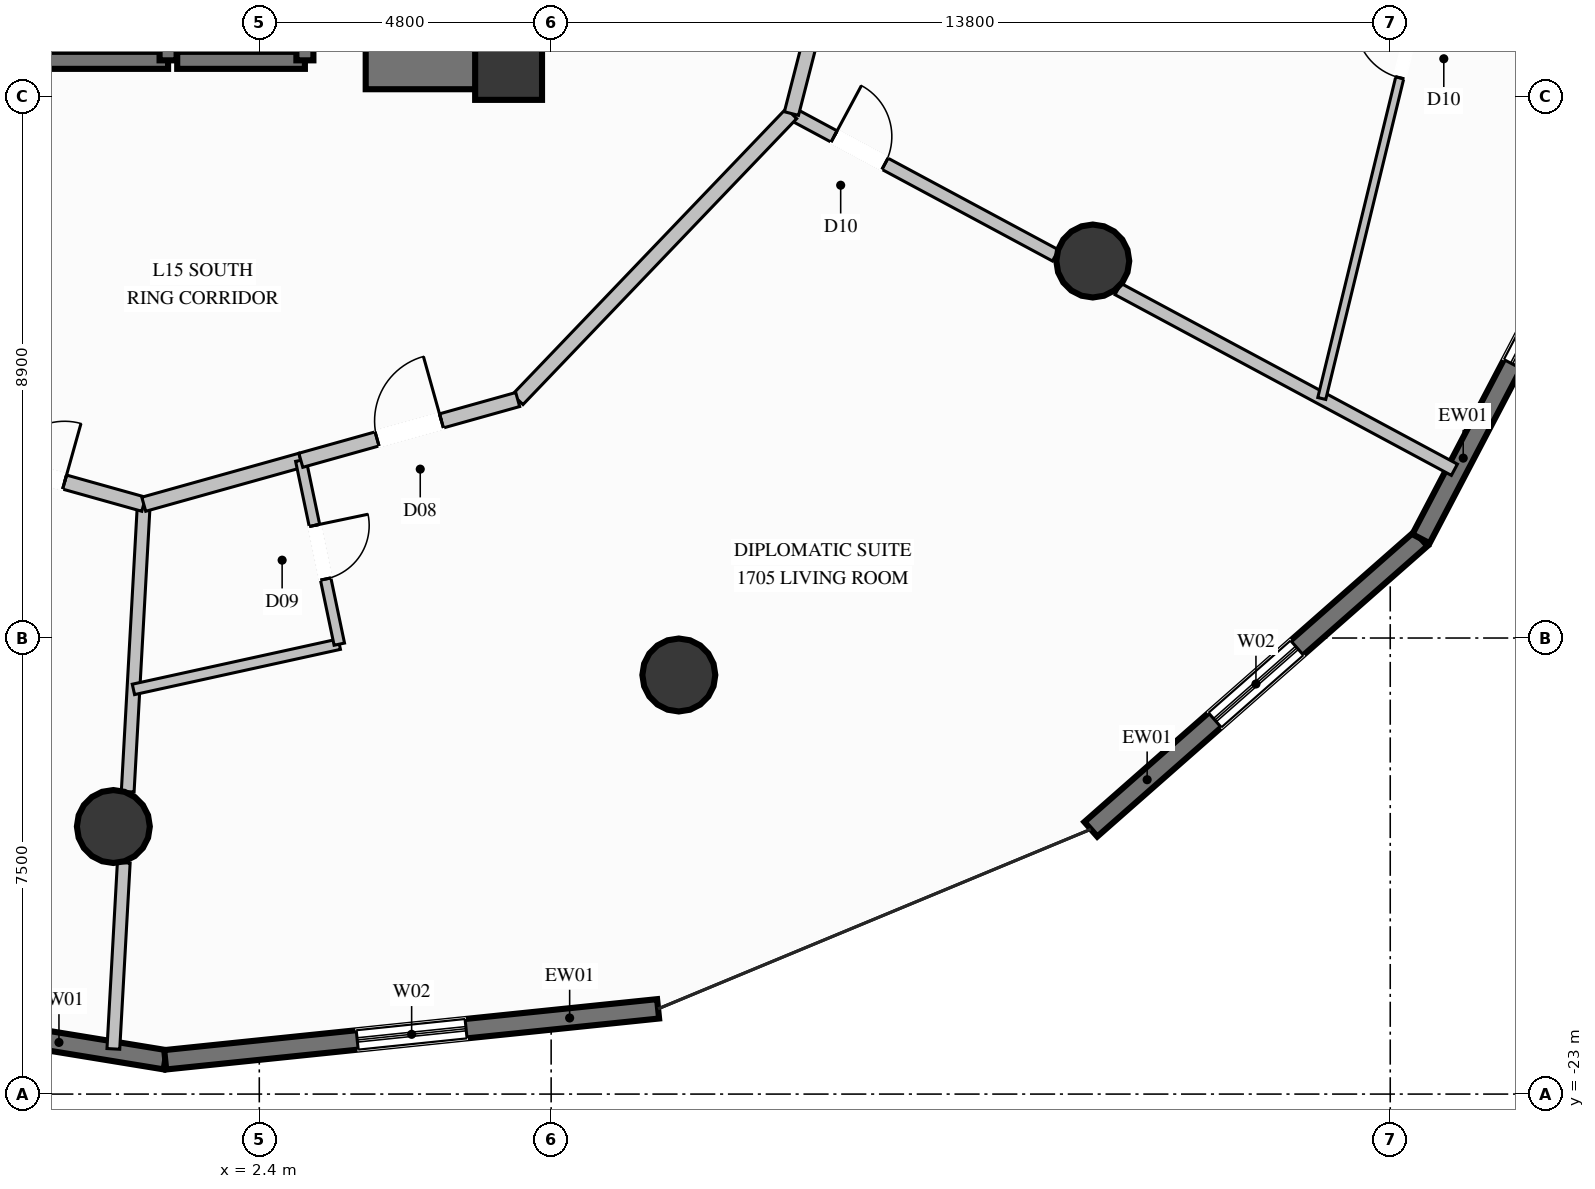
"""IFC4 building model, lengths in metres.
Left out: names, types, materials, properties, quantities, classifications, styles, units other than length and angle.
Written with IfcOpenShell. Run it as: python <this file> out.ifc"""

import sys

from ifc_helpers import new_model, si_unit, direction, frame, frame_2d, origin, origin_2d, place, context, subcontext, project, spatial, rectangle, circle, extrude, element, fill, save


model = new_model("IFC4")
c1 = context("Model", 3, precision=1e-05, world=origin(), true_north=direction((0.0, 1.0)))
c2 = subcontext(c1, "Body", "Model", "MODEL_VIEW")
j1 = project(units=[si_unit("LENGTHUNIT", "METRE"), si_unit("PLANEANGLEUNIT", "RADIAN")], contexts=[c1])
p1 = place(None, origin())
s1 = spatial("IfcSite", under=j1, at=p1, CompositionType="ELEMENT")
p2 = place(p1, origin())
s2 = spatial("IfcBuilding", under=s1, at=p2, CompositionType="ELEMENT")
p3 = place(p2, frame((0.0, 0.0, 64.4)))
s3 = spatial("IfcBuildingStorey", under=s2, at=p3, CompositionType="ELEMENT", Elevation=64.4)
p4 = place(p3, frame((6.5, -6.1, 0.0), z_axis=(0.0, 0.0, 1.0), x_axis=(1.0, 0.0, 0.0)))
e1 = element("IfcColumn", 1, at=p4, inside=s3, PredefinedType="COLUMN", context=c2, shape_type="SweptSolid", body=[
    extrude(rectangle(XDim=1.1, YDim=1.1, at=origin_2d()), origin(), (0.0, 0.0, 1.0), 3.6),
])
p5 = place(p3, frame((4.15, -6.1, 0.0), z_axis=(0.0, 0.0, 1.0), x_axis=(1.0, 0.0, 0.0)))
e2 = element("IfcWall", 2, at=p5, inside=s3, PredefinedType="SHEAR", context=c2, shape_type="SweptSolid", body=[
    extrude(rectangle(XDim=1.975, YDim=0.75, at=frame_2d((0.988, 0.0))), origin(), (0.0, 0.0, 1.0), 3.6),
])
p6 = place(p3, frame((6.5, -6.475, 0.0), z_axis=(0.0, 0.0, 1.0), x_axis=(0.0, 1.0, 0.0)))
e3 = element("IfcWall", 3, at=p6, inside=s3, PredefinedType="SHEAR", context=c2, shape_type="SweptSolid", body=[
    extrude(rectangle(XDim=4.125, YDim=0.75, at=frame_2d((2.062, 0.0))), origin(), (0.0, 0.0, 1.0), 3.6),
])
for number, where, z_axis, x_axis in (
    (4, (0.0, -18.6, 0.0), (0.0, 0.0, 1.0), (1.0, 0.0, 0.0)),
    (5, (9.3, -16.108, 0.0), (0.0, 0.0, 1.0), (1.0, 0.0, 0.0)),
    (6, (16.108, -9.3, 0.0), (0.0, 0.0, 1.0), (1.0, 0.0, 0.0)),
):
    element("IfcColumn", number, at=place(p3, frame(where, z_axis=z_axis, x_axis=x_axis)), inside=s3, PredefinedType="COLUMN", context=c2, shape_type="SweptSolid", body=[
        extrude(circle(Radius=0.6, at=origin_2d()), origin(), (0.0, 0.0, 1.0), 3.6),
    ])
p7 = place(p3, frame((0.853, -22.436, 0.0), z_axis=(0.0, 0.0, 1.0), x_axis=(-0.986907440065, 0.161287645973, 0.0)))
e7 = element("IfcWall", 7, at=p7, inside=s3, PredefinedType="SOLIDWALL", context=c2, shape_type="SweptSolid", body=[
    extrude(rectangle(XDim=8.413, YDim=0.32, at=frame_2d((4.207, 0.0))), origin(), (0.0, 0.0, 1.0), 3.34),
])
p8 = place(p7, frame((3.792, 0.0, 0.35)))
e8 = element("IfcOpeningElement", 8, at=p8, cuts=e7, PredefinedType="OPENING", context=c2, shape_type="SweptSolid", body=[
    extrude(rectangle(XDim=1.8, YDim=2.6, at=frame_2d((0.9, 1.3))), frame((0.0, 0.17, 0.0), z_axis=(0.0, -1.0, 0.0), x_axis=(1.0, 0.0, 0.0)), (0.0, 0.0, 1.0), 0.34),
])
p9 = place(p3, frame((8.959, -21.598, 0.0), z_axis=(0.0, 0.0, 1.0), x_axis=(-0.994696973701, -0.102849066644, 0.0)))
e9 = element("IfcWall", 9, at=p9, inside=s3, PredefinedType="SOLIDWALL", context=c2, shape_type="SweptSolid", body=[
    extrude(rectangle(XDim=8.149, YDim=0.32, at=frame_2d((4.075, 0.0))), origin(), (0.0, 0.0, 1.0), 3.34),
])
p10 = place(p9, frame((3.175, 0.0, 0.35)))
e10 = element("IfcOpeningElement", 10, at=p10, cuts=e9, PredefinedType="OPENING", context=c2, shape_type="SweptSolid", body=[
    extrude(rectangle(XDim=1.8, YDim=2.6, at=frame_2d((0.9, 1.3))), frame((0.0, 0.17, 0.0), z_axis=(0.0, -1.0, 0.0), x_axis=(1.0, 0.0, 0.0)), (0.0, 0.0, 1.0), 0.34),
])
p11 = place(p3, frame((21.506, -13.867, 0.0), z_axis=(0.0, 0.0, 1.0), x_axis=(-0.750746326024, -0.660590609955, 0.0)))
e11 = element("IfcWall", 11, at=p11, inside=s3, PredefinedType="SOLIDWALL", context=c2, shape_type="SweptSolid", body=[
    extrude(rectangle(XDim=7.233, YDim=0.32, at=frame_2d((3.617, 0.0))), origin(), (0.0, 0.0, 1.0), 3.34),
])
p12 = place(p11, frame((2.716, 0.0, 0.35)))
e12 = element("IfcOpeningElement", 12, at=p12, cuts=e11, PredefinedType="OPENING", context=c2, shape_type="SweptSolid", body=[
    extrude(rectangle(XDim=1.8, YDim=2.6, at=frame_2d((0.9, 1.3))), frame((0.0, 0.17, 0.0), z_axis=(0.0, -1.0, 0.0), x_axis=(1.0, 0.0, 0.0)), (0.0, 0.0, 1.0), 0.34),
])
p13 = place(p3, frame((24.719, -7.732, 0.0), z_axis=(0.0, 0.0, 1.0), x_axis=(-0.463929273227, -0.885872242168, 0.0)))
e13 = element("IfcWall", 13, at=p13, inside=s3, PredefinedType="SOLIDWALL", context=c2, shape_type="SweptSolid", body=[
    extrude(rectangle(XDim=6.925, YDim=0.32, at=frame_2d((3.463, 0.0))), origin(), (0.0, 0.0, 1.0), 3.34),
])
p14 = place(p13, frame((1.883, 0.0, 0.35)))
e14 = element("IfcOpeningElement", 14, at=p14, cuts=e13, PredefinedType="OPENING", context=c2, shape_type="SweptSolid", body=[
    extrude(rectangle(XDim=1.8, YDim=2.6, at=frame_2d((0.9, 1.3))), frame((0.0, 0.17, 0.0), z_axis=(0.0, -1.0, 0.0), x_axis=(1.0, 0.0, 0.0)), (0.0, 0.0, 1.0), 0.34),
])
p15 = place(p3, frame((-1.2, -6.0, 0.0), z_axis=(0.0, 0.0, 1.0), x_axis=(1.0, 0.0, 0.0)))
e15 = element("IfcWall", 15, at=p15, inside=s3, PredefinedType="SOLIDWALL", context=c2, shape_type="SweptSolid", body=[
    extrude(rectangle(XDim=2.1, YDim=0.28, at=frame_2d((1.05, 0.0))), origin(), (0.0, 0.0, 1.0), 3.34),
])
p16 = place(p3, frame((0.9, -6.0, 0.0), z_axis=(0.0, 0.0, 1.0), x_axis=(0.0, 1.0, 0.0)))
e16 = element("IfcWall", 16, at=p16, inside=s3, PredefinedType="SOLIDWALL", context=c2, shape_type="SweptSolid", body=[
    extrude(rectangle(XDim=2.5, YDim=0.28, at=frame_2d((1.25, 0.0))), origin(), (0.0, 0.0, 1.0), 3.34),
])
p17 = place(p3, frame((1.05, -6.0, 0.0), z_axis=(0.0, 0.0, 1.0), x_axis=(1.0, 0.0, 0.0)))
e17 = element("IfcWall", 17, at=p17, inside=s3, PredefinedType="SOLIDWALL", context=c2, shape_type="SweptSolid", body=[
    extrude(rectangle(XDim=2.1, YDim=0.28, at=frame_2d((1.05, 0.0))), origin(), (0.0, 0.0, 1.0), 3.34),
])
p18 = place(p3, frame((3.15, -6.0, 0.0), z_axis=(0.0, 0.0, 1.0), x_axis=(0.0, 1.0, 0.0)))
e18 = element("IfcWall", 18, at=p18, inside=s3, PredefinedType="SOLIDWALL", context=c2, shape_type="SweptSolid", body=[
    extrude(rectangle(XDim=2.5, YDim=0.28, at=frame_2d((1.25, 0.0))), origin(), (0.0, 0.0, 1.0), 3.34),
])
p19 = place(p3, frame((0.5, -13.3, 0.0), z_axis=(0.0, 0.0, 1.0), x_axis=(-0.05574419663, -0.998445083388, 0.0)))
e19 = element("IfcWall", 19, at=p19, inside=s3, PredefinedType="PARTITIONING", context=c2, shape_type="SweptSolid", body=[
    extrude(rectangle(XDim=4.734, YDim=0.21, at=frame_2d((2.367, 0.0))), origin(), (0.0, 0.0, 1.0), 3.34),
])
p20 = place(p3, frame((0.171, -19.196, 0.0), z_axis=(0.0, 0.0, 1.0), x_axis=(-0.055743466812, -0.998445124134, 0.0)))
e20 = element("IfcWall", 20, at=p20, inside=s3, PredefinedType="PARTITIONING", context=c2, shape_type="SweptSolid", body=[
    extrude(rectangle(XDim=3.066, YDim=0.21, at=frame_2d((1.533, 0.0))), origin(), (0.0, 0.0, 1.0), 3.34),
])
p21 = place(p3, frame((11.152, -6.875, 0.0), z_axis=(0.0, 0.0, 1.0), x_axis=(0.880939761167, -0.473228419682, 0.0)))
e21 = element("IfcWall", 21, at=p21, inside=s3, PredefinedType="PARTITIONING", context=c2, shape_type="SweptSolid", body=[
    extrude(rectangle(XDim=4.93, YDim=0.21, at=frame_2d((2.465, 0.0))), origin(), (0.0, 0.0, 1.0), 2.708),
])
p22 = place(p21, frame((0.796, 0.0, 0.0)))
e22 = element("IfcOpeningElement", 22, at=p22, cuts=e21, PredefinedType="OPENING", context=c2, shape_type="SweptSolid", body=[
    extrude(rectangle(XDim=0.95, YDim=2.1, at=frame_2d((0.475, 1.05))), frame((0.0, 0.115, 0.0), z_axis=(0.0, -1.0, 0.0), x_axis=(1.0, 0.0, 0.0)), (0.0, 0.0, 1.0), 0.23),
])
p23 = place(p3, frame((16.523, -9.761, 0.0), z_axis=(0.0, 0.0, 1.0), x_axis=(0.88092509849, -0.473255714017, 0.0)))
e23 = element("IfcWall", 23, at=p23, inside=s3, PredefinedType="PARTITIONING", context=c2, shape_type="SweptSolid", body=[
    extrude(rectangle(XDim=6.28, YDim=0.21, at=frame_2d((3.14, 0.0))), origin(), (0.0, 0.0, 1.0), 3.34),
])
p24 = place(p3, frame((-3.067, -12.301, 0.0), z_axis=(0.0, 0.0, 1.0), x_axis=(0.962943481199, -0.269703266603, 0.0)))
e24 = element("IfcWall", 24, at=p24, inside=s3, PredefinedType="PARTITIONING", context=c2, shape_type="SweptSolid", body=[
    extrude(rectangle(XDim=3.704, YDim=0.24, at=frame_2d((1.852, 0.0))), origin(), (0.0, 0.0, 1.0), 2.917),
])
p25 = place(p24, frame((1.352, 0.0, 0.0)))
e25 = element("IfcOpeningElement", 25, at=p25, cuts=e24, PredefinedType="OPENING", context=c2, shape_type="SweptSolid", body=[
    extrude(rectangle(XDim=1.0, YDim=2.2, at=frame_2d((0.5, 1.1))), frame((0.0, 0.13, 0.0), z_axis=(0.0, -1.0, 0.0), x_axis=(1.0, 0.0, 0.0)), (0.0, 0.0, 1.0), 0.26),
])
p26 = place(p3, frame((0.5, -13.3, 0.0), z_axis=(0.0, 0.0, 1.0), x_axis=(0.96297347206, 0.269596164862, 0.0)))
e26 = element("IfcWall", 26, at=p26, inside=s3, PredefinedType="PARTITIONING", context=c2, shape_type="SweptSolid", body=[
    extrude(rectangle(XDim=2.682, YDim=0.24, at=frame_2d((1.341, 0.0))), origin(), (0.0, 0.0, 1.0), 3.34),
])
p27 = place(p3, frame((0.33, -16.345, 0.0), z_axis=(0.0, 0.0, 1.0), x_axis=(0.976706198213, 0.21458099257, 0.0)))
e27 = element("IfcWall", 27, at=p27, inside=s3, PredefinedType="PLUMBINGWALL", context=c2, shape_type="SweptSolid", body=[
    extrude(rectangle(XDim=3.467, YDim=0.175, at=frame_2d((1.733, 0.0))), origin(), (0.0, 0.0, 1.0), 3.34),
])
p28 = place(p3, frame((3.083, -12.577, 0.0), z_axis=(0.0, 0.0, 1.0), x_axis=(0.204891321789, -0.978784729272, 0.0)))
e28 = element("IfcWall", 28, at=p28, inside=s3, PredefinedType="PLUMBINGWALL", context=c2, shape_type="SweptSolid", body=[
    extrude(rectangle(XDim=3.09, YDim=0.175, at=frame_2d((1.545, 0.0))), origin(), (0.0, 0.0, 1.0), 3.34),
])
p29 = place(p28, frame((1.095, 0.0, 0.0)))
e29 = element("IfcOpeningElement", 29, at=p29, cuts=e28, PredefinedType="OPENING", context=c2, shape_type="SweptSolid", body=[
    extrude(rectangle(XDim=0.9, YDim=2.1, at=frame_2d((0.45, 1.05))), frame((0.0, 0.098, 0.0), z_axis=(0.0, -1.0, 0.0), x_axis=(1.0, 0.0, 0.0)), (0.0, 0.0, 1.0), 0.195),
])
p30 = place(p3, frame((6.65, -11.578, 0.0), z_axis=(0.0, 0.0, 1.0), x_axis=(0.691526541012, 0.72235105252, 0.0)))
e30 = element("IfcWall", 30, at=p30, inside=s3, PredefinedType="PARTITIONING", context=c2, shape_type="SweptSolid", body=[
    extrude(rectangle(XDim=6.51, YDim=0.24, at=frame_2d((3.255, 0.0))), origin(), (0.0, 0.0, 1.0), 3.34),
])
p31 = place(p3, frame((3.083, -12.577, 0.0), z_axis=(0.0, 0.0, 1.0), x_axis=(0.962943481199, 0.269703266603, 0.0)))
e31 = element("IfcWall", 31, at=p31, inside=s3, PredefinedType="PARTITIONING", context=c2, shape_type="SweptSolid", body=[
    extrude(rectangle(XDim=3.704, YDim=0.24, at=frame_2d((1.852, 0.0))), origin(), (0.0, 0.0, 1.0), 2.917),
])
p32 = place(p31, frame((1.302, 0.0, 0.0)))
e32 = element("IfcOpeningElement", 32, at=p32, cuts=e31, PredefinedType="OPENING", context=c2, shape_type="SweptSolid", body=[
    extrude(rectangle(XDim=1.1, YDim=2.3, at=frame_2d((0.55, 1.15))), frame((0.0, 0.13, 0.0), z_axis=(0.0, -1.0, 0.0), x_axis=(1.0, 0.0, 0.0)), (0.0, 0.0, 1.0), 0.26),
])
p33 = place(p3, frame((11.152, -6.875, 0.0), z_axis=(0.0, 0.0, 1.0), x_axis=(0.248446193127, 0.968645698447, 0.0)))
e33 = element("IfcWall", 33, at=p33, inside=s3, PredefinedType="PARTITIONING", context=c2, shape_type="SweptSolid", body=[
    extrude(rectangle(XDim=6.633, YDim=0.24, at=frame_2d((3.316, 0.0))), origin(), (0.0, 0.0, 1.0), 2.917),
])
p34 = place(p3, frame((19.874, -11.561, 0.0), z_axis=(0.0, 0.0, 1.0), x_axis=(0.236258171871, 0.971690319096, 0.0)))
e34 = element("IfcWall", 34, at=p34, inside=s3, PredefinedType="PARTITIONING", context=c2, shape_type="SweptSolid", body=[
    extrude(rectangle(XDim=11.805, YDim=0.135, at=frame_2d((5.903, 0.0))), origin(), (0.0, 0.0, 1.0), 3.34),
])
p35 = place(p34, frame((5.428, 0.0, 0.0)))
e35 = element("IfcOpeningElement", 35, at=p35, cuts=e34, PredefinedType="OPENING", context=c2, shape_type="SweptSolid", body=[
    extrude(rectangle(XDim=0.95, YDim=2.1, at=frame_2d((0.475, 1.05))), frame((0.0, 0.078, 0.0), z_axis=(0.0, -1.0, 0.0), x_axis=(1.0, 0.0, 0.0)), (0.0, 0.0, 1.0), 0.155),
])
p36 = place(p10, origin())
e36 = element("IfcWindow", 36, at=p36, inside=s3, PartitioningType="SINGLE_PANEL", PredefinedType="WINDOW", context=c2, shape_type="SweptSolid", body=[
    extrude(rectangle(XDim=1.8, YDim=2.6, at=frame_2d((0.9, 1.3))), frame((0.0, 0.03, 0.0), z_axis=(0.0, -1.0, 0.0), x_axis=(1.0, 0.0, 0.0)), (0.0, 0.0, 1.0), 0.06),
])
fill(e10, e36)
p37 = place(p12, origin())
e37 = element("IfcWindow", 37, at=p37, inside=s3, PartitioningType="SINGLE_PANEL", PredefinedType="WINDOW", context=c2, shape_type="SweptSolid", body=[
    extrude(rectangle(XDim=1.8, YDim=2.6, at=frame_2d((0.9, 1.3))), frame((0.0, 0.03, 0.0), z_axis=(0.0, -1.0, 0.0), x_axis=(1.0, 0.0, 0.0)), (0.0, 0.0, 1.0), 0.06),
])
fill(e12, e37)
p38 = place(p14, origin())
e38 = element("IfcWindow", 38, at=p38, inside=s3, PartitioningType="SINGLE_PANEL", PredefinedType="WINDOW", context=c2, shape_type="SweptSolid", body=[
    extrude(rectangle(XDim=1.8, YDim=2.6, at=frame_2d((0.9, 1.3))), frame((0.0, 0.03, 0.0), z_axis=(0.0, -1.0, 0.0), x_axis=(1.0, 0.0, 0.0)), (0.0, 0.0, 1.0), 0.06),
])
fill(e14, e38)
p39 = place(p25, origin())
e39 = element("IfcDoor", 39, at=p39, inside=s3, OperationType="SINGLE_SWING_RIGHT", PredefinedType="DOOR", context=c2, shape_type="SweptSolid", body=[
    extrude(rectangle(XDim=1.0, YDim=2.2, at=frame_2d((0.5, 1.1))), frame((0.0, 0.025, 0.0), z_axis=(0.0, -1.0, 0.0), x_axis=(1.0, 0.0, 0.0)), (0.0, 0.0, 1.0), 0.05),
])
fill(e25, e39)
p40 = place(p29, origin())
e40 = element("IfcDoor", 40, at=p40, inside=s3, OperationType="SINGLE_SWING_LEFT", PredefinedType="DOOR", context=c2, shape_type="SweptSolid", body=[
    extrude(rectangle(XDim=0.9, YDim=2.1, at=frame_2d((0.45, 1.05))), frame((0.0, 0.025, 0.0), z_axis=(0.0, -1.0, 0.0), x_axis=(1.0, 0.0, 0.0)), (0.0, 0.0, 1.0), 0.05),
])
fill(e29, e40)
p41 = place(p32, origin())
e41 = element("IfcDoor", 41, at=p41, inside=s3, OperationType="SINGLE_SWING_RIGHT", PredefinedType="DOOR", context=c2, shape_type="SweptSolid", body=[
    extrude(rectangle(XDim=1.1, YDim=2.3, at=frame_2d((0.55, 1.15))), frame((0.0, 0.025, 0.0), z_axis=(0.0, -1.0, 0.0), x_axis=(1.0, 0.0, 0.0)), (0.0, 0.0, 1.0), 0.05),
])
fill(e32, e41)
p42 = place(p22, origin())
e42 = element("IfcDoor", 42, at=p42, inside=s3, OperationType="SINGLE_SWING_LEFT", PredefinedType="DOOR", context=c2, shape_type="SweptSolid", body=[
    extrude(rectangle(XDim=0.95, YDim=2.1, at=frame_2d((0.475, 1.05))), frame((0.0, 0.025, 0.0), z_axis=(0.0, -1.0, 0.0), x_axis=(1.0, 0.0, 0.0)), (0.0, 0.0, 1.0), 0.05),
])
fill(e22, e42)
p43 = place(p35, origin())
e43 = element("IfcDoor", 43, at=p43, inside=s3, OperationType="SINGLE_SWING_RIGHT", PredefinedType="DOOR", context=c2, shape_type="SweptSolid", body=[
    extrude(rectangle(XDim=0.95, YDim=2.1, at=frame_2d((0.475, 1.05))), frame((0.0, 0.025, 0.0), z_axis=(0.0, -1.0, 0.0), x_axis=(1.0, 0.0, 0.0)), (0.0, 0.0, 1.0), 0.05),
])
fill(e35, e43)
save(model, sys.argv[1])
